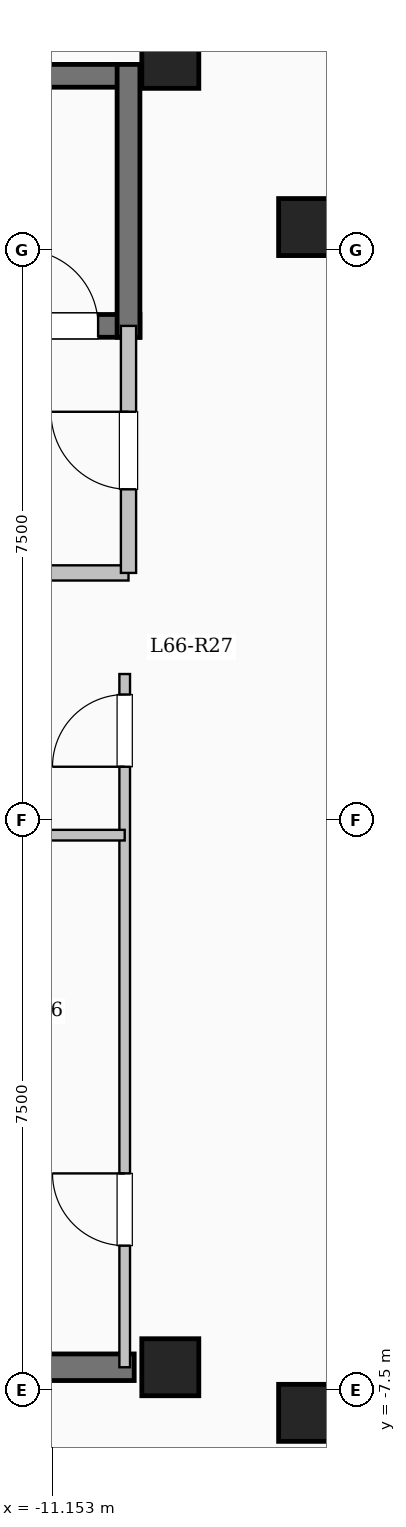
"""IFC4 building model, lengths in metres.
Left out: names, types, materials, properties, quantities, classifications, styles, units other than length and angle.
Written with IfcOpenShell. Run it as: python <this file> out.ifc"""

import sys

from ifc_helpers import new_model, si_unit, direction, frame, frame_2d, origin, origin_2d, place, context, subcontext, project, spatial, rectangle, extrude, element, fill, save


model = new_model("IFC4")
c1 = context("Model", 3, precision=1e-05, world=origin(), true_north=direction((0.0, 1.0)))
c2 = subcontext(c1, "Body", "Model", "MODEL_VIEW")
j1 = project(units=[si_unit("LENGTHUNIT", "METRE"), si_unit("PLANEANGLEUNIT", "RADIAN")], contexts=[c1])
p1 = place(None, origin())
s1 = spatial("IfcSite", under=j1, at=p1, CompositionType="ELEMENT")
p2 = place(p1, origin())
s2 = spatial("IfcBuilding", under=s1, at=p2, CompositionType="ELEMENT")
p3 = place(p2, frame((0.0, 0.0, 244.85)))
s3 = spatial("IfcBuildingStorey", under=s2, at=p3, CompositionType="ELEMENT", Elevation=244.85)
for number, where, z_axis, x_axis in (
    (1, (-7.8, -7.8, 0.0), (0.0, 0.0, 1.0), (1.0, 0.0, 0.0)),
    (2, (-7.8, 7.8, 0.0), (0.0, 0.0, 1.0), (1.0, 0.0, 0.0)),
    (3, (-9.6, -7.2, 0.0), (0.0, 0.0, 1.0), (1.0, 0.0, 0.0)),
    (4, (-9.6, 10.0, 0.0), (0.0, 0.0, 1.0), (1.0, 0.0, 0.0)),
):
    element("IfcColumn", number, at=place(p3, frame(where, z_axis=z_axis, x_axis=x_axis)), inside=s3, PredefinedType="COLUMN", context=c2, shape_type="SweptSolid", body=[
        extrude(rectangle(XDim=0.75, YDim=0.75, at=origin_2d()), origin(), (0.0, 0.0, 1.0), 3.35),
    ])
p4 = place(p3, frame((-18.0, 9.79, 0.0), z_axis=(0.0, 0.0, 1.0), x_axis=(1.0, 0.0, 0.0)))
e5 = element("IfcWall", 5, at=p4, inside=s3, PredefinedType="SHEAR", context=c2, shape_type="SweptSolid", body=[
    extrude(rectangle(XDim=8.0, YDim=0.3, at=frame_2d((4.0, 0.0))), origin(), (0.0, 0.0, 1.0), 3.35),
])
p5 = place(p3, frame((-18.0, 6.5, 0.0), z_axis=(0.0, 0.0, 1.0), x_axis=(1.0, 0.0, 0.0)))
e6 = element("IfcWall", 6, at=p5, inside=s3, PredefinedType="SHEAR", context=c2, shape_type="SweptSolid", body=[
    extrude(rectangle(XDim=8.0, YDim=0.3, at=frame_2d((4.0, 0.0))), origin(), (0.0, 0.0, 1.0), 3.35),
])
p6 = place(p5, frame((6.45, 0.0, 0.0)))
e7 = element("IfcOpeningElement", 7, at=p6, cuts=e6, PredefinedType="OPENING", context=c2, shape_type="SweptSolid", body=[
    extrude(rectangle(XDim=1.0, YDim=2.15, at=frame_2d((0.5, 1.075))), frame((0.0, 0.16, 0.0), z_axis=(0.0, -1.0, 0.0), x_axis=(1.0, 0.0, 0.0)), (0.0, 0.0, 1.0), 0.32),
])
p7 = place(p3, frame((-10.15, 6.35, 0.0), z_axis=(0.0, 0.0, 1.0), x_axis=(0.0, 1.0, 0.0)))
e8 = element("IfcWall", 8, at=p7, inside=s3, PredefinedType="SHEAR", context=c2, shape_type="SweptSolid", body=[
    extrude(rectangle(XDim=3.59, YDim=0.3, at=frame_2d((1.795, 0.0))), origin(), (0.0, 0.0, 1.0), 3.35),
])
p8 = place(p3, frame((-15.55, 3.25, 0.0), z_axis=(0.0, 0.0, 1.0), x_axis=(1.0, 0.0, 0.0)))
e9 = element("IfcWall", 9, at=p8, inside=s3, PredefinedType="SOLIDWALL", context=c2, shape_type="SweptSolid", body=[
    extrude(rectangle(XDim=5.4, YDim=0.2, at=frame_2d((2.7, 0.0))), origin(), (0.0, 0.0, 1.0), 3.1),
])
p9 = place(p3, frame((-10.15, 3.25, 0.0), z_axis=(0.0, 0.0, 1.0), x_axis=(0.0, 1.0, 0.0)))
e10 = element("IfcWall", 10, at=p9, inside=s3, PredefinedType="SOLIDWALL", context=c2, shape_type="SweptSolid", body=[
    extrude(rectangle(XDim=3.25, YDim=0.2, at=frame_2d((1.625, 0.0))), origin(), (0.0, 0.0, 1.0), 3.1),
])
p10 = place(p9, frame((1.1, 0.0, 0.0)))
e11 = element("IfcOpeningElement", 11, at=p10, cuts=e10, PredefinedType="OPENING", context=c2, shape_type="SweptSolid", body=[
    extrude(rectangle(XDim=1.02, YDim=2.15, at=frame_2d((0.51, 1.075))), frame((0.0, 0.11, 0.0), z_axis=(0.0, -1.0, 0.0), x_axis=(1.0, 0.0, 0.0)), (0.0, 0.0, 1.0), 0.22),
])
p11 = place(p3, frame((-18.625, -7.2, 0.0), z_axis=(0.0, 0.0, 1.0), x_axis=(1.0, 0.0, 0.0)))
e12 = element("IfcWall", 12, at=p11, inside=s3, PredefinedType="SHEAR", context=c2, shape_type="SweptSolid", body=[
    extrude(rectangle(XDim=8.55, YDim=0.35, at=frame_2d((4.275, 0.0))), origin(), (0.0, 0.0, 1.0), 3.35),
])
p12 = place(p11, frame((1.725, 0.0, 0.0)))
e13 = element("IfcOpeningElement", 13, at=p12, cuts=e12, PredefinedType="OPENING", context=c2, shape_type="SweptSolid", body=[
    extrude(rectangle(XDim=1.12, YDim=2.15, at=frame_2d((0.56, 1.075))), frame((0.0, 0.185, 0.0), z_axis=(0.0, -1.0, 0.0), x_axis=(1.0, 0.0, 0.0)), (0.0, 0.0, 1.0), 0.37),
])
p13 = place(p3, frame((-10.2, -7.2, 0.0), z_axis=(0.0, 0.0, 1.0), x_axis=(0.0, 1.0, 0.0)))
e14 = element("IfcWall", 14, at=p13, inside=s3, PredefinedType="PARTITIONING", context=c2, shape_type="SweptSolid", body=[
    extrude(rectangle(XDim=9.12, YDim=0.14, at=frame_2d((4.56, 0.0))), origin(), (0.0, 0.0, 1.0), 3.1),
])
p14 = place(p13, frame((1.6, 0.0, 0.0)))
e15 = element("IfcOpeningElement", 15, at=p14, cuts=e14, PredefinedType="OPENING", context=c2, shape_type="SweptSolid", body=[
    extrude(rectangle(XDim=0.95, YDim=2.12, at=frame_2d((0.475, 1.06))), frame((0.0, 0.08, 0.0), z_axis=(0.0, -1.0, 0.0), x_axis=(1.0, 0.0, 0.0)), (0.0, 0.0, 1.0), 0.16),
])
p15 = place(p13, frame((7.9, 0.0, 0.0)))
e16 = element("IfcOpeningElement", 16, at=p15, cuts=e14, PredefinedType="OPENING", context=c2, shape_type="SweptSolid", body=[
    extrude(rectangle(XDim=0.95, YDim=2.12, at=frame_2d((0.475, 1.06))), frame((0.0, 0.08, 0.0), z_axis=(0.0, -1.0, 0.0), x_axis=(1.0, 0.0, 0.0)), (0.0, 0.0, 1.0), 0.16),
])
p16 = place(p3, frame((-12.9, -0.2, 0.0), z_axis=(0.0, 0.0, 1.0), x_axis=(1.0, 0.0, 0.0)))
e17 = element("IfcWall", 17, at=p16, inside=s3, PredefinedType="PARTITIONING", context=c2, shape_type="SweptSolid", body=[
    extrude(rectangle(XDim=2.7, YDim=0.14, at=frame_2d((1.35, 0.0))), origin(), (0.0, 0.0, 1.0), 3.1),
])
p17 = place(p6, origin())
e18 = element("IfcDoor", 18, at=p17, inside=s3, OperationType="SINGLE_SWING_LEFT", PredefinedType="DOOR", context=c2, shape_type="SweptSolid", body=[
    extrude(rectangle(XDim=1.0, YDim=2.15, at=frame_2d((0.5, 1.075))), frame((0.0, 0.025, 0.0), z_axis=(0.0, -1.0, 0.0), x_axis=(1.0, 0.0, 0.0)), (0.0, 0.0, 1.0), 0.05),
])
fill(e7, e18)
p18 = place(p10, origin())
e19 = element("IfcDoor", 19, at=p18, inside=s3, OperationType="SINGLE_SWING_RIGHT", PredefinedType="DOOR", context=c2, shape_type="SweptSolid", body=[
    extrude(rectangle(XDim=1.02, YDim=2.15, at=frame_2d((0.51, 1.075))), frame((0.0, 0.025, 0.0), z_axis=(0.0, -1.0, 0.0), x_axis=(1.0, 0.0, 0.0)), (0.0, 0.0, 1.0), 0.05),
])
fill(e11, e19)
p19 = place(p14, origin())
e20 = element("IfcDoor", 20, at=p19, inside=s3, OperationType="SINGLE_SWING_RIGHT", PredefinedType="DOOR", context=c2, shape_type="SweptSolid", body=[
    extrude(rectangle(XDim=0.95, YDim=2.12, at=frame_2d((0.475, 1.06))), frame((0.0, 0.025, 0.0), z_axis=(0.0, -1.0, 0.0), x_axis=(1.0, 0.0, 0.0)), (0.0, 0.0, 1.0), 0.05),
])
fill(e15, e20)
p20 = place(p15, origin())
e21 = element("IfcDoor", 21, at=p20, inside=s3, OperationType="SINGLE_SWING_LEFT", PredefinedType="DOOR", context=c2, shape_type="SweptSolid", body=[
    extrude(rectangle(XDim=0.95, YDim=2.12, at=frame_2d((0.475, 1.06))), frame((0.0, 0.025, 0.0), z_axis=(0.0, -1.0, 0.0), x_axis=(1.0, 0.0, 0.0)), (0.0, 0.0, 1.0), 0.05),
])
fill(e16, e21)
save(model, sys.argv[1])
